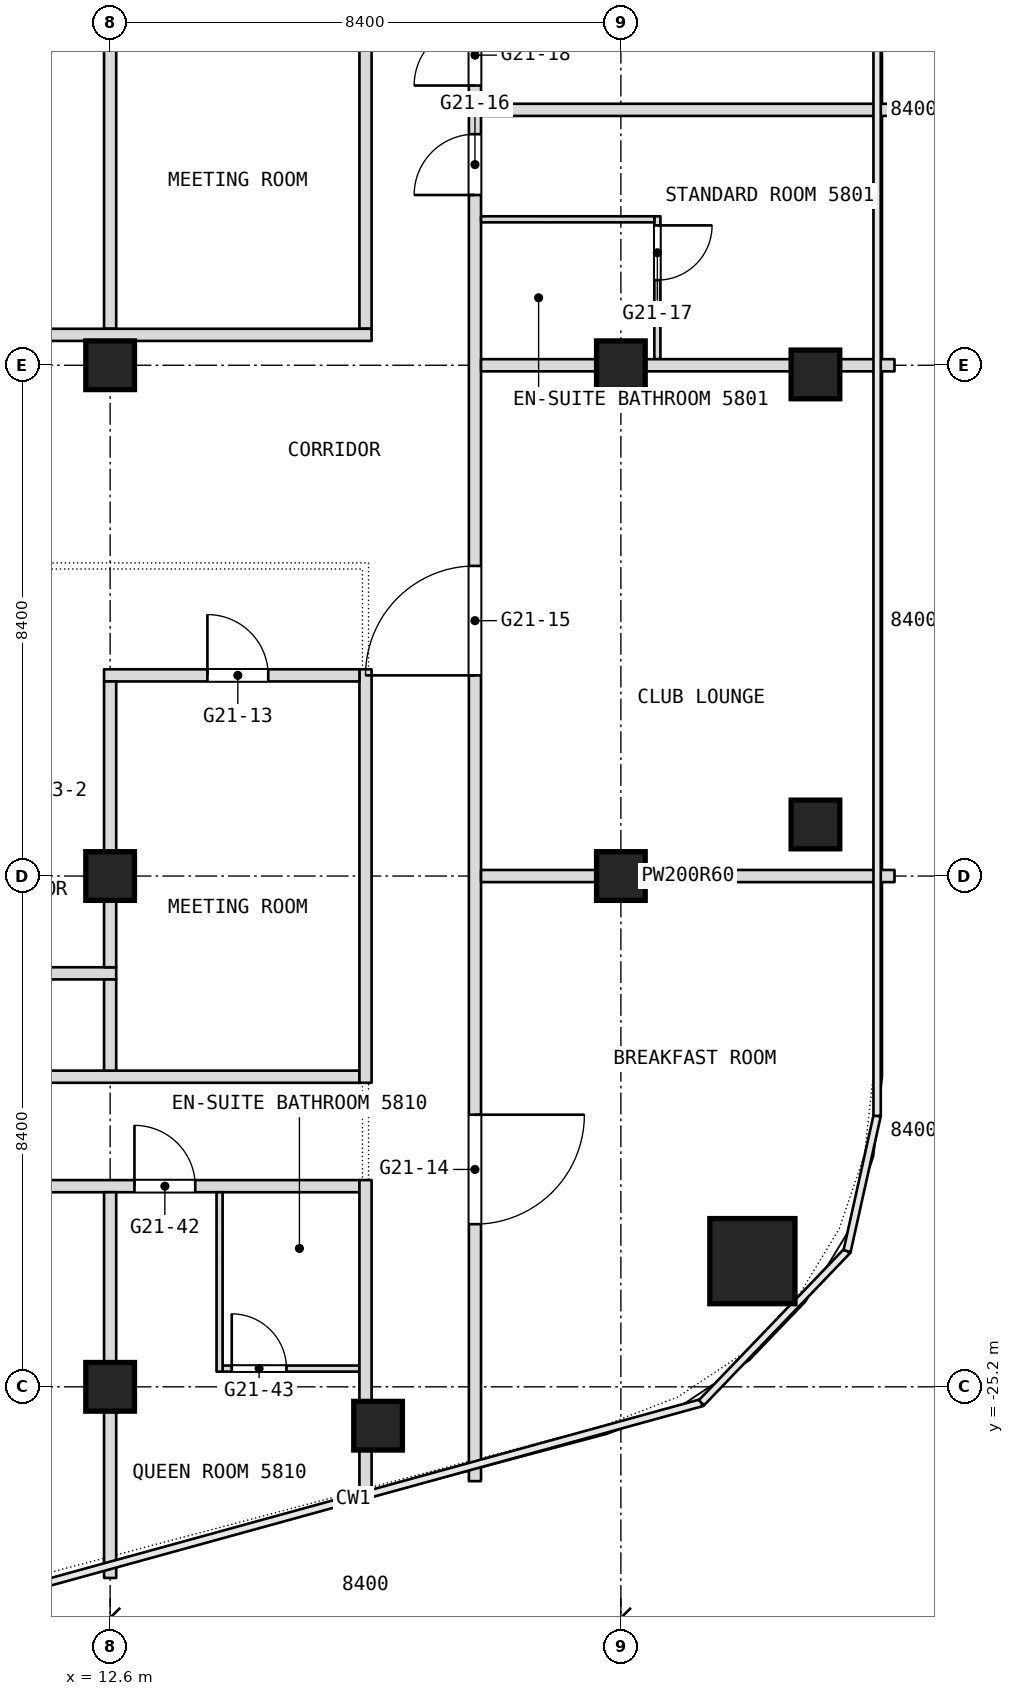
"""IFC4 building model, lengths in metres.
Left out: names, types, materials, properties, quantities, classifications, styles, units other than length and angle.
Written with IfcOpenShell. Run it as: python <this file> out.ifc"""

import sys

from ifc_helpers import new_model, si_unit, direction, frame, frame_2d, origin, origin_2d, place, context, subcontext, project, spatial, rectangle, extrude, element, fill, save


model = new_model("IFC4")
c1 = context("Model", 3, precision=1e-05, world=origin(), true_north=direction((0.0, 1.0)))
c2 = subcontext(c1, "Body", "Model", "MODEL_VIEW")
j1 = project(units=[si_unit("LENGTHUNIT", "METRE"), si_unit("PLANEANGLEUNIT", "RADIAN")], contexts=[c1])
p1 = place(None, origin())
s1 = spatial("IfcSite", under=j1, at=p1, CompositionType="ELEMENT")
p2 = place(p1, origin())
s2 = spatial("IfcBuilding", under=s1, at=p2, CompositionType="ELEMENT")
p3 = place(p2, frame((0.0, 0.0, 245.3)))
s3 = spatial("IfcBuildingStorey", under=s2, at=p3, CompositionType="ELEMENT", Elevation=245.3)
p4 = place(p3, frame((23.163, -23.133, 0.0), z_axis=(0.0, 0.0, 1.0), x_axis=(1.0, 0.0, 0.0)))
e1 = element("IfcColumn", 1, at=p4, inside=s3, PredefinedType="COLUMN", context=c2, shape_type="SweptSolid", body=[
    extrude(rectangle(XDim=1.4, YDim=1.4, at=origin_2d()), origin(), (0.0, 0.0, 1.0), 3.6),
])
for number, where, z_axis, x_axis in (
    (2, (12.6, -25.2, 0.0), (0.0, 0.0, 1.0), (1.0, 0.0, 0.0)),
    (3, (12.6, -16.8, 0.0), (0.0, 0.0, 1.0), (1.0, 0.0, 0.0)),
    (4, (12.6, -8.4, 0.0), (0.0, 0.0, 1.0), (1.0, 0.0, 0.0)),
    (5, (21.0, -16.8, 0.0), (0.0, 0.0, 1.0), (1.0, 0.0, 0.0)),
    (6, (21.0, -8.4, 0.0), (0.0, 0.0, 1.0), (1.0, 0.0, 0.0)),
    (7, (24.2, -8.551, 0.0), (0.0, 0.0, 1.0), (1.0, 0.0, 0.0)),
    (8, (24.2, -15.952, 0.0), (0.0, 0.0, 1.0), (1.0, 0.0, 0.0)),
    (9, (17.007, -25.839, 0.0), (0.0, 0.0, 1.0), (1.0, 0.0, 0.0)),
):
    element("IfcColumn", number, at=place(p3, frame(where, z_axis=z_axis, x_axis=x_axis)), inside=s3, PredefinedType="COLUMN", context=c2, shape_type="SweptSolid", body=[
        extrude(rectangle(XDim=0.8, YDim=0.8, at=origin_2d()), origin(), (0.0, 0.0, 1.0), 3.6),
    ])
p5 = place(p3, frame((14.45, -24.9, 0.0), z_axis=(0.0, 0.0, 1.0), x_axis=(1.0, 0.0, 0.0)))
e10 = element("IfcWall", 10, at=p5, inside=s3, PredefinedType="PARTITIONING", context=c2, shape_type="SweptSolid", body=[
    extrude(rectangle(XDim=2.25, YDim=0.1, at=frame_2d((1.125, 0.0))), origin(), (0.0, 0.0, 1.0), 3.34),
])
p6 = place(p5, frame((0.15, 0.0, 0.0)))
e11 = element("IfcOpeningElement", 11, at=p6, cuts=e10, PredefinedType="OPENING", context=c2, shape_type="SweptSolid", body=[
    extrude(rectangle(XDim=0.9, YDim=2.1, at=frame_2d((0.45, 1.05))), frame((0.0, 0.05, 0.0), z_axis=(0.0, -1.0, 0.0), x_axis=(1.0, 0.0, 0.0)), (0.0, 0.0, 1.0), 0.1),
])
p7 = place(p3, frame((-16.7, -21.9, 0.0), z_axis=(0.0, 0.0, 1.0), x_axis=(1.0, 0.0, 0.0)))
e12 = element("IfcWall", 12, at=p7, inside=s3, PredefinedType="PARTITIONING", context=c2, shape_type="SweptSolid", body=[
    extrude(rectangle(XDim=33.4, YDim=0.2, at=frame_2d((16.7, 0.0))), origin(), (0.0, 0.0, 1.0), 3.34),
])
p8 = place(p7, frame((0.3, 0.0, 0.0)))
e13 = element("IfcOpeningElement", 13, at=p8, cuts=e12, PredefinedType="OPENING", context=c2, shape_type="SweptSolid", body=[
    extrude(rectangle(XDim=1.0, YDim=2.1, at=frame_2d((0.5, 1.05))), frame((0.0, 0.1, 0.0), z_axis=(0.0, -1.0, 0.0), x_axis=(1.0, 0.0, 0.0)), (0.0, 0.0, 1.0), 0.2),
])
p9 = place(p7, frame((9.85, 0.0, 0.0)))
e14 = element("IfcOpeningElement", 14, at=p9, cuts=e12, PredefinedType="OPENING", context=c2, shape_type="SweptSolid", body=[
    extrude(rectangle(XDim=1.1, YDim=2.1, at=frame_2d((0.55, 1.05))), frame((0.0, 0.1, 0.0), z_axis=(0.0, -1.0, 0.0), x_axis=(1.0, 0.0, 0.0)), (0.0, 0.0, 1.0), 0.2),
])
p10 = place(p7, frame((16.1, 0.0, 0.0)))
e15 = element("IfcOpeningElement", 15, at=p10, cuts=e12, PredefinedType="OPENING", context=c2, shape_type="SweptSolid", body=[
    extrude(rectangle(XDim=1.1, YDim=2.1, at=frame_2d((0.55, 1.05))), frame((0.0, 0.1, 0.0), z_axis=(0.0, -1.0, 0.0), x_axis=(1.0, 0.0, 0.0)), (0.0, 0.0, 1.0), 0.2),
])
p11 = place(p7, frame((24.2, 0.0, 0.0)))
e16 = element("IfcOpeningElement", 16, at=p11, cuts=e12, PredefinedType="OPENING", context=c2, shape_type="SweptSolid", body=[
    extrude(rectangle(XDim=1.8, YDim=2.1, at=frame_2d((0.9, 1.05))), frame((0.0, 0.1, 0.0), z_axis=(0.0, -1.0, 0.0), x_axis=(1.0, 0.0, 0.0)), (0.0, 0.0, 1.0), 0.2),
])
p12 = place(p7, frame((29.7, 0.0, 0.0)))
e17 = element("IfcOpeningElement", 17, at=p12, cuts=e12, PredefinedType="OPENING", context=c2, shape_type="SweptSolid", body=[
    extrude(rectangle(XDim=1.0, YDim=2.1, at=frame_2d((0.5, 1.05))), frame((0.0, 0.1, 0.0), z_axis=(0.0, -1.0, 0.0), x_axis=(1.0, 0.0, 0.0)), (0.0, 0.0, 1.0), 0.2),
])
p13 = place(p3, frame((21.6, -8.3, 0.0), z_axis=(0.0, 0.0, 1.0), x_axis=(0.0, 1.0, 0.0)))
e18 = element("IfcWall", 18, at=p13, inside=s3, PredefinedType="PARTITIONING", context=c2, shape_type="SweptSolid", body=[
    extrude(rectangle(XDim=2.35, YDim=0.1, at=frame_2d((1.175, 0.0))), origin(), (0.0, 0.0, 1.0), 3.34),
])
p14 = place(p13, frame((1.3, 0.0, 0.0)))
e19 = element("IfcOpeningElement", 19, at=p14, cuts=e18, PredefinedType="OPENING", context=c2, shape_type="SweptSolid", body=[
    extrude(rectangle(XDim=0.9, YDim=2.1, at=frame_2d((0.45, 1.05))), frame((0.0, 0.05, 0.0), z_axis=(0.0, -1.0, 0.0), x_axis=(1.0, 0.0, 0.0)), (0.0, 0.0, 1.0), 0.1),
])
p15 = place(p3, frame((-16.7, -20.1, 0.0), z_axis=(0.0, 0.0, 1.0), x_axis=(1.0, 0.0, 0.0)))
e20 = element("IfcWall", 20, at=p15, inside=s3, PredefinedType="PARTITIONING", context=c2, shape_type="SweptSolid", body=[
    extrude(rectangle(XDim=33.4, YDim=0.2, at=frame_2d((16.7, 0.0))), origin(), (0.0, 0.0, 1.0), 3.34),
])
p16 = place(p3, frame((18.6, -26.751, 0.0), z_axis=(0.0, 0.0, 1.0), x_axis=(0.0, 1.0, 0.0)))
e21 = element("IfcWall", 21, at=p16, inside=s3, PredefinedType="PARTITIONING", context=c2, shape_type="SweptSolid", body=[
    extrude(rectangle(XDim=49.091, YDim=0.2, at=frame_2d((24.545, 0.0))), origin(), (0.0, 0.0, 1.0), 3.34),
])
p17 = place(p16, frame((4.226, 0.0, 0.0)))
e22 = element("IfcOpeningElement", 22, at=p17, cuts=e21, PredefinedType="OPENING", context=c2, shape_type="SweptSolid", body=[
    extrude(rectangle(XDim=1.8, YDim=2.1, at=frame_2d((0.9, 1.05))), frame((0.0, 0.1, 0.0), z_axis=(0.0, -1.0, 0.0), x_axis=(1.0, 0.0, 0.0)), (0.0, 0.0, 1.0), 0.2),
])
p18 = place(p16, frame((13.251, 0.0, 0.0)))
e23 = element("IfcOpeningElement", 23, at=p18, cuts=e21, PredefinedType="OPENING", context=c2, shape_type="SweptSolid", body=[
    extrude(rectangle(XDim=1.8, YDim=2.1, at=frame_2d((0.9, 1.05))), frame((0.0, 0.1, 0.0), z_axis=(0.0, -1.0, 0.0), x_axis=(1.0, 0.0, 0.0)), (0.0, 0.0, 1.0), 0.2),
])
p19 = place(p16, frame((21.151, 0.0, 0.0)))
e24 = element("IfcOpeningElement", 24, at=p19, cuts=e21, PredefinedType="OPENING", context=c2, shape_type="SweptSolid", body=[
    extrude(rectangle(XDim=1.0, YDim=2.1, at=frame_2d((0.5, 1.05))), frame((0.0, 0.1, 0.0), z_axis=(0.0, -1.0, 0.0), x_axis=(1.0, 0.0, 0.0)), (0.0, 0.0, 1.0), 0.2),
])
p20 = place(p16, frame((22.951, 0.0, 0.0)))
e25 = element("IfcOpeningElement", 25, at=p20, cuts=e21, PredefinedType="OPENING", context=c2, shape_type="SweptSolid", body=[
    extrude(rectangle(XDim=1.0, YDim=2.1, at=frame_2d((0.5, 1.05))), frame((0.0, 0.1, 0.0), z_axis=(0.0, -1.0, 0.0), x_axis=(1.0, 0.0, 0.0)), (0.0, 0.0, 1.0), 0.2),
])
p21 = place(p16, frame((27.151, 0.0, 0.0)))
e26 = element("IfcOpeningElement", 26, at=p21, cuts=e21, PredefinedType="OPENING", context=c2, shape_type="SweptSolid", body=[
    extrude(rectangle(XDim=1.0, YDim=2.1, at=frame_2d((0.5, 1.05))), frame((0.0, 0.1, 0.0), z_axis=(0.0, -1.0, 0.0), x_axis=(1.0, 0.0, 0.0)), (0.0, 0.0, 1.0), 0.2),
])
p22 = place(p16, frame((33.751, 0.0, 0.0)))
e27 = element("IfcOpeningElement", 27, at=p22, cuts=e21, PredefinedType="OPENING", context=c2, shape_type="SweptSolid", body=[
    extrude(rectangle(XDim=1.0, YDim=2.1, at=frame_2d((0.5, 1.05))), frame((0.0, 0.1, 0.0), z_axis=(0.0, -1.0, 0.0), x_axis=(1.0, 0.0, 0.0)), (0.0, 0.0, 1.0), 0.2),
])
p23 = place(p16, frame((38.851, 0.0, 0.0)))
e28 = element("IfcOpeningElement", 28, at=p23, cuts=e21, PredefinedType="OPENING", context=c2, shape_type="SweptSolid", body=[
    extrude(rectangle(XDim=1.1, YDim=2.1, at=frame_2d((0.55, 1.05))), frame((0.0, 0.1, 0.0), z_axis=(0.0, -1.0, 0.0), x_axis=(1.0, 0.0, 0.0)), (0.0, 0.0, 1.0), 0.2),
])
p24 = place(p16, frame((44.051, 0.0, 0.0)))
e29 = element("IfcOpeningElement", 29, at=p24, cuts=e21, PredefinedType="OPENING", context=c2, shape_type="SweptSolid", body=[
    extrude(rectangle(XDim=1.0, YDim=2.1, at=frame_2d((0.5, 1.05))), frame((0.0, 0.1, 0.0), z_axis=(0.0, -1.0, 0.0), x_axis=(1.0, 0.0, 0.0)), (0.0, 0.0, 1.0), 0.2),
])
p25 = place(p3, frame((5.7, -18.4, 0.0), z_axis=(0.0, 0.0, 1.0), x_axis=(1.0, 0.0, 0.0)))
e30 = element("IfcWall", 30, at=p25, inside=s3, PredefinedType="PARTITIONING", context=c2, shape_type="SweptSolid", body=[
    extrude(rectangle(XDim=7.0, YDim=0.2, at=frame_2d((3.5, 0.0))), origin(), (0.0, 0.0, 1.0), 3.34),
])
p26 = place(p25, frame((1.8, 0.0, 0.0)))
e31 = element("IfcOpeningElement", 31, at=p26, cuts=e30, PredefinedType="OPENING", context=c2, shape_type="SweptSolid", body=[
    extrude(rectangle(XDim=1.8, YDim=2.1, at=frame_2d((0.9, 1.05))), frame((0.0, 0.1, 0.0), z_axis=(0.0, -1.0, 0.0), x_axis=(1.0, 0.0, 0.0)), (0.0, 0.0, 1.0), 0.2),
])
p27 = place(p3, frame((16.8, -27.229, 0.0), z_axis=(0.0, 0.0, 1.0), x_axis=(0.0, 1.0, 0.0)))
e32 = element("IfcWall", 32, at=p27, inside=s3, PredefinedType="PARTITIONING", context=c2, shape_type="SweptSolid", body=[
    extrude(rectangle(XDim=5.429, YDim=0.2, at=frame_2d((2.714, 0.0))), origin(), (0.0, 0.0, 1.0), 3.34),
])
p28 = place(p3, frame((16.8, -20.2, 0.0), z_axis=(0.0, 0.0, 1.0), x_axis=(0.0, 1.0, 0.0)))
e33 = element("IfcWall", 33, at=p28, inside=s3, PredefinedType="PARTITIONING", context=c2, shape_type="SweptSolid", body=[
    extrude(rectangle(XDim=6.8, YDim=0.2, at=frame_2d((3.4, 0.0))), origin(), (0.0, 0.0, 1.0), 3.34),
])
p29 = place(p3, frame((16.8, -7.8, 0.0), z_axis=(0.0, 0.0, 1.0), x_axis=(0.0, 1.0, 0.0)))
e34 = element("IfcWall", 34, at=p29, inside=s3, PredefinedType="PARTITIONING", context=c2, shape_type="SweptSolid", body=[
    extrude(rectangle(XDim=5.9, YDim=0.2, at=frame_2d((2.95, 0.0))), origin(), (0.0, 0.0, 1.0), 3.34),
])
p30 = place(p3, frame((18.7, -16.8, 0.0), z_axis=(0.0, 0.0, 1.0), x_axis=(1.0, 0.0, 0.0)))
e35 = element("IfcWall", 35, at=p30, inside=s3, PredefinedType="PARTITIONING", context=c2, shape_type="SweptSolid", body=[
    extrude(rectangle(XDim=6.8, YDim=0.2, at=frame_2d((3.4, 0.0))), origin(), (0.0, 0.0, 1.0), 2.94),
])
p31 = place(p3, frame((14.4, -24.95, 0.0), z_axis=(0.0, 0.0, 1.0), x_axis=(0.0, 1.0, 0.0)))
e36 = element("IfcWall", 36, at=p31, inside=s3, PredefinedType="PARTITIONING", context=c2, shape_type="SweptSolid", body=[
    extrude(rectangle(XDim=2.95, YDim=0.1, at=frame_2d((1.475, 0.0))), origin(), (0.0, 0.0, 1.0), 3.34),
])
p32 = place(p3, frame((12.5, -13.5, 0.0), z_axis=(0.0, 0.0, 1.0), x_axis=(1.0, 0.0, 0.0)))
e37 = element("IfcWall", 37, at=p32, inside=s3, PredefinedType="PARTITIONING", context=c2, shape_type="SweptSolid", body=[
    extrude(rectangle(XDim=4.2, YDim=0.2, at=frame_2d((2.1, 0.0))), origin(), (0.0, 0.0, 1.0), 3.34),
])
p33 = place(p32, frame((1.7, 0.0, 0.0)))
e38 = element("IfcOpeningElement", 38, at=p33, cuts=e37, PredefinedType="OPENING", context=c2, shape_type="SweptSolid", body=[
    extrude(rectangle(XDim=1.0, YDim=2.1, at=frame_2d((0.5, 1.05))), frame((0.0, 0.1, 0.0), z_axis=(0.0, -1.0, 0.0), x_axis=(1.0, 0.0, 0.0)), (0.0, 0.0, 1.0), 0.2),
])
p34 = place(p3, frame((12.6, -28.343, 0.0), z_axis=(0.0, 0.0, 1.0), x_axis=(0.0, 1.0, 0.0)))
e39 = element("IfcWall", 39, at=p34, inside=s3, PredefinedType="PARTITIONING", context=c2, shape_type="SweptSolid", body=[
    extrude(rectangle(XDim=6.343, YDim=0.2, at=frame_2d((3.171, 0.0))), origin(), (0.0, 0.0, 1.0), 3.34),
])
p35 = place(p3, frame((12.6, -20.0, 0.0), z_axis=(0.0, 0.0, 1.0), x_axis=(0.0, 1.0, 0.0)))
e40 = element("IfcWall", 40, at=p35, inside=s3, PredefinedType="PARTITIONING", context=c2, shape_type="SweptSolid", body=[
    extrude(rectangle(XDim=1.5, YDim=0.2, at=frame_2d((0.75, 0.0))), origin(), (0.0, 0.0, 1.0), 3.34),
])
p36 = place(p3, frame((12.6, -7.8, 0.0), z_axis=(0.0, 0.0, 1.0), x_axis=(0.0, 1.0, 0.0)))
e41 = element("IfcWall", 41, at=p36, inside=s3, PredefinedType="PARTITIONING", context=c2, shape_type="SweptSolid", body=[
    extrude(rectangle(XDim=5.9, YDim=0.2, at=frame_2d((2.95, 0.0))), origin(), (0.0, 0.0, 1.0), 3.34),
])
p37 = place(p3, frame((12.6, -18.3, 0.0), z_axis=(0.0, 0.0, 1.0), x_axis=(0.0, 1.0, 0.0)))
e42 = element("IfcWall", 42, at=p37, inside=s3, PredefinedType="PARTITIONING", context=c2, shape_type="SweptSolid", body=[
    extrude(rectangle(XDim=4.7, YDim=0.2, at=frame_2d((2.35, 0.0))), origin(), (0.0, 0.0, 1.0), 3.34),
])
p38 = place(p3, frame((18.7, -8.4, 0.0), z_axis=(0.0, 0.0, 1.0), x_axis=(1.0, 0.0, 0.0)))
e43 = element("IfcWall", 43, at=p38, inside=s3, PredefinedType="PARTITIONING", context=c2, shape_type="SweptSolid", body=[
    extrude(rectangle(XDim=6.8, YDim=0.2, at=frame_2d((3.4, 0.0))), origin(), (0.0, 0.0, 1.0), 2.94),
])
p39 = place(p3, frame((10.6, -7.9, 0.0), z_axis=(0.0, 0.0, 1.0), x_axis=(1.0, 0.0, 0.0)))
e44 = element("IfcWall", 44, at=p39, inside=s3, PredefinedType="PARTITIONING", context=c2, shape_type="SweptSolid", body=[
    extrude(rectangle(XDim=6.3, YDim=0.2, at=frame_2d((3.15, 0.0))), origin(), (0.0, 0.0, 1.0), 3.34),
])
p40 = place(p3, frame((18.7, -6.0, 0.0), z_axis=(0.0, 0.0, 1.0), x_axis=(1.0, 0.0, 0.0)))
e45 = element("IfcWall", 45, at=p40, inside=s3, PredefinedType="PARTITIONING", context=c2, shape_type="SweptSolid", body=[
    extrude(rectangle(XDim=2.85, YDim=0.1, at=frame_2d((1.425, 0.0))), origin(), (0.0, 0.0, 1.0), 3.34),
])
p41 = place(p3, frame((18.7, -4.2, 0.0), z_axis=(0.0, 0.0, 1.0), x_axis=(1.0, 0.0, 0.0)))
e46 = element("IfcWall", 46, at=p41, inside=s3, PredefinedType="PARTITIONING", context=c2, shape_type="SweptSolid", body=[
    extrude(rectangle(XDim=6.8, YDim=0.2, at=frame_2d((3.4, 0.0))), origin(), (0.0, 0.0, 1.0), 3.34),
])
p42 = place(p6, origin())
e47 = element("IfcDoor", 47, at=p42, inside=s3, OperationType="SINGLE_SWING_LEFT", PredefinedType="DOOR", context=c2, shape_type="SweptSolid", body=[
    extrude(rectangle(XDim=0.9, YDim=2.1, at=frame_2d((0.45, 1.05))), frame((0.0, 0.025, 0.0), z_axis=(0.0, -1.0, 0.0), x_axis=(1.0, 0.0, 0.0)), (0.0, 0.0, 1.0), 0.05),
])
fill(e11, e47)
p43 = place(p12, origin())
e48 = element("IfcDoor", 48, at=p43, inside=s3, OperationType="SINGLE_SWING_RIGHT", PredefinedType="DOOR", context=c2, shape_type="SweptSolid", body=[
    extrude(rectangle(XDim=1.0, YDim=2.1, at=frame_2d((0.5, 1.05))), frame((0.0, 0.025, 0.0), z_axis=(0.0, -1.0, 0.0), x_axis=(1.0, 0.0, 0.0)), (0.0, 0.0, 1.0), 0.05),
])
fill(e17, e48)
p44 = place(p14, origin())
e49 = element("IfcDoor", 49, at=p44, inside=s3, OperationType="SINGLE_SWING_RIGHT", PredefinedType="DOOR", context=c2, shape_type="SweptSolid", body=[
    extrude(rectangle(XDim=0.9, YDim=2.1, at=frame_2d((0.45, 1.05))), frame((0.0, 0.025, 0.0), z_axis=(0.0, -1.0, 0.0), x_axis=(1.0, 0.0, 0.0)), (0.0, 0.0, 1.0), 0.05),
])
fill(e19, e49)
p45 = place(p17, origin())
e50 = element("IfcDoor", 50, at=p45, inside=s3, OperationType="DOUBLE_DOOR_SINGLE_SWING", PredefinedType="DOOR", context=c2, shape_type="SweptSolid", body=[
    extrude(rectangle(XDim=1.8, YDim=2.1, at=frame_2d((0.9, 1.05))), frame((0.0, 0.025, 0.0), z_axis=(0.0, -1.0, 0.0), x_axis=(1.0, 0.0, 0.0)), (0.0, 0.0, 1.0), 0.05),
])
fill(e22, e50)
p46 = place(p18, origin())
e51 = element("IfcDoor", 51, at=p46, inside=s3, OperationType="DOUBLE_DOOR_SINGLE_SWING", PredefinedType="DOOR", context=c2, shape_type="SweptSolid", body=[
    extrude(rectangle(XDim=1.8, YDim=2.1, at=frame_2d((0.9, 1.05))), frame((0.0, 0.025, 0.0), z_axis=(0.0, -1.0, 0.0), x_axis=(1.0, 0.0, 0.0)), (0.0, 0.0, 1.0), 0.05),
])
fill(e23, e51)
p47 = place(p19, origin())
e52 = element("IfcDoor", 52, at=p47, inside=s3, OperationType="SINGLE_SWING_RIGHT", PredefinedType="DOOR", context=c2, shape_type="SweptSolid", body=[
    extrude(rectangle(XDim=1.0, YDim=2.1, at=frame_2d((0.5, 1.05))), frame((0.0, 0.025, 0.0), z_axis=(0.0, -1.0, 0.0), x_axis=(1.0, 0.0, 0.0)), (0.0, 0.0, 1.0), 0.05),
])
fill(e24, e52)
p48 = place(p20, origin())
e53 = element("IfcDoor", 53, at=p48, inside=s3, OperationType="SINGLE_SWING_RIGHT", PredefinedType="DOOR", context=c2, shape_type="SweptSolid", body=[
    extrude(rectangle(XDim=1.0, YDim=2.1, at=frame_2d((0.5, 1.05))), frame((0.0, 0.025, 0.0), z_axis=(0.0, -1.0, 0.0), x_axis=(1.0, 0.0, 0.0)), (0.0, 0.0, 1.0), 0.05),
])
fill(e25, e53)
p49 = place(p33, origin())
e54 = element("IfcDoor", 54, at=p49, inside=s3, OperationType="SINGLE_SWING_LEFT", PredefinedType="DOOR", context=c2, shape_type="SweptSolid", body=[
    extrude(rectangle(XDim=1.0, YDim=2.1, at=frame_2d((0.5, 1.05))), frame((0.0, 0.025, 0.0), z_axis=(0.0, -1.0, 0.0), x_axis=(1.0, 0.0, 0.0)), (0.0, 0.0, 1.0), 0.05),
])
fill(e38, e54)
save(model, sys.argv[1])
